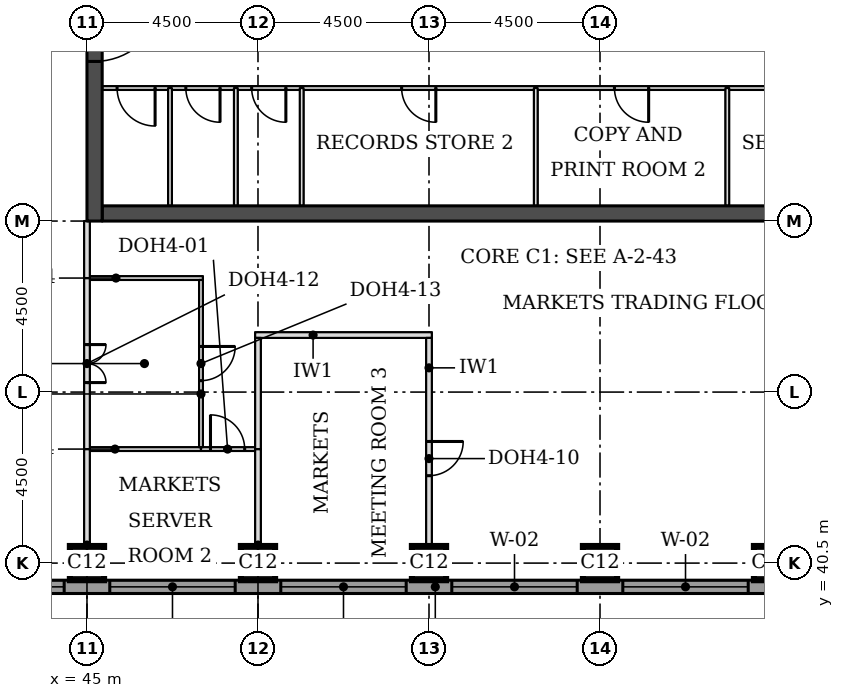
"""IFC4 building model, lengths in metres.
Left out: names, types, materials, properties, quantities, classifications, styles, units other than length and angle.
Written with IfcOpenShell. Run it as: python <this file> out.ifc"""

import sys

from ifc_helpers import new_model, si_unit, direction, frame, frame_2d, origin, origin_2d, place, context, subcontext, project, spatial, rectangle, extrude, element, fill, save


model = new_model("IFC4")
c1 = context("Model", 3, precision=1e-05, world=origin(), true_north=direction((0.0, 1.0)))
c2 = subcontext(c1, "Body", "Model", "MODEL_VIEW")
j1 = project(units=[si_unit("LENGTHUNIT", "METRE"), si_unit("PLANEANGLEUNIT", "RADIAN")], contexts=[c1])
p1 = place(None, origin())
s1 = spatial("IfcSite", under=j1, at=p1, CompositionType="ELEMENT")
p2 = place(p1, origin())
s2 = spatial("IfcBuilding", under=s1, at=p2, CompositionType="ELEMENT")
p3 = place(p2, frame((0.0, 0.0, 173.6)))
s3 = spatial("IfcBuildingStorey", under=s2, at=p3, CompositionType="ELEMENT", Elevation=173.6)
for number, where, z_axis, x_axis in (
    (1, (45.0, 40.5, 0.0), (0.0, 0.0, 1.0), (1.0, 0.0, 0.0)),
    (2, (49.5, 40.5, 0.0), (0.0, 0.0, 1.0), (1.0, 0.0, 0.0)),
    (3, (54.0, 40.5, 0.0), (0.0, 0.0, 1.0), (1.0, 0.0, 0.0)),
    (4, (58.5, 40.5, 0.0), (0.0, 0.0, 1.0), (1.0, 0.0, 0.0)),
    (5, (63.0, 40.5, 0.0), (0.0, 0.0, 1.0), (1.0, 0.0, 0.0)),
):
    element("IfcColumn", number, at=place(p3, frame(where, z_axis=z_axis, x_axis=x_axis)), inside=s3, PredefinedType="COLUMN", context=c2, shape_type="SweptSolid", body=[
        extrude(rectangle(XDim=0.9, YDim=0.9, at=origin_2d()), origin(), (0.0, 0.0, 1.0), 3.7),
    ])
p4 = place(p3, frame((45.4, 49.7, 0.0), z_axis=(0.0, 0.0, 1.0), x_axis=(1.0, 0.0, 0.0)))
e6 = element("IfcWall", 6, at=p4, inside=s3, PredefinedType="SHEAR", context=c2, shape_type="SweptSolid", body=[
    extrude(rectangle(XDim=21.7, YDim=0.4, at=frame_2d((10.85, 0.0))), origin(), (0.0, 0.0, 1.0), 3.7),
])
p5 = place(p3, frame((45.2, 49.5, 0.0), z_axis=(0.0, 0.0, 1.0), x_axis=(0.0, 1.0, 0.0)))
e7 = element("IfcWall", 7, at=p5, inside=s3, PredefinedType="SHEAR", context=c2, shape_type="SweptSolid", body=[
    extrude(rectangle(XDim=22.5, YDim=0.4, at=frame_2d((11.25, 0.0))), origin(), (0.0, 0.0, 1.0), 3.7),
])
p6 = place(p5, frame((4.2, 0.0, 0.0)))
e8 = element("IfcOpeningElement", 8, at=p6, cuts=e7, PredefinedType="OPENING", context=c2, shape_type="SweptSolid", body=[
    extrude(rectangle(XDim=1.8, YDim=2.1, at=frame_2d((0.9, 1.05))), frame((0.0, 0.21, 0.0), z_axis=(0.0, -1.0, 0.0), x_axis=(1.0, 0.0, 0.0)), (0.0, 0.0, 1.0), 0.42),
])
p7 = place(p5, frame((6.9, 0.0, 0.0)))
e9 = element("IfcOpeningElement", 9, at=p7, cuts=e7, PredefinedType="OPENING", context=c2, shape_type="SweptSolid", body=[
    extrude(rectangle(XDim=1.1, YDim=2.1, at=frame_2d((0.55, 1.05))), frame((0.0, 0.21, 0.0), z_axis=(0.0, -1.0, 0.0), x_axis=(1.0, 0.0, 0.0)), (0.0, 0.0, 1.0), 0.42),
])
p8 = place(p5, frame((13.6, 0.0, 0.0)))
e10 = element("IfcOpeningElement", 10, at=p8, cuts=e7, PredefinedType="OPENING", context=c2, shape_type="SweptSolid", body=[
    extrude(rectangle(XDim=1.1, YDim=2.1, at=frame_2d((0.55, 1.05))), frame((0.0, 0.21, 0.0), z_axis=(0.0, -1.0, 0.0), x_axis=(1.0, 0.0, 0.0)), (0.0, 0.0, 1.0), 0.42),
])
p9 = place(p5, frame((16.5, 0.0, 0.0)))
e11 = element("IfcOpeningElement", 11, at=p9, cuts=e7, PredefinedType="OPENING", context=c2, shape_type="SweptSolid", body=[
    extrude(rectangle(XDim=1.8, YDim=2.1, at=frame_2d((0.9, 1.05))), frame((0.0, 0.21, 0.0), z_axis=(0.0, -1.0, 0.0), x_axis=(1.0, 0.0, 0.0)), (0.0, 0.0, 1.0), 0.42),
])
p10 = place(p3, frame((36.0, 39.875, 0.0), z_axis=(0.0, 0.0, 1.0), x_axis=(1.0, 0.0, 0.0)))
e12 = element("IfcWall", 12, at=p10, inside=s3, PredefinedType="STANDARD", context=c2, shape_type="SweptSolid", body=[
    extrude(rectangle(XDim=36.331, YDim=0.35, at=frame_2d((18.166, 0.0))), origin(), (0.0, 0.0, 1.0), 3.525),
])
p11 = place(p10, frame((5.1, 0.0, 0.9)))
e13 = element("IfcOpeningElement", 13, at=p11, cuts=e12, PredefinedType="OPENING", context=c2, shape_type="SweptSolid", body=[
    extrude(rectangle(XDim=3.3, YDim=1.9, at=frame_2d((1.65, 0.95))), frame((0.0, 0.185, 0.0), z_axis=(0.0, -1.0, 0.0), x_axis=(1.0, 0.0, 0.0)), (0.0, 0.0, 1.0), 0.37),
])
p12 = place(p10, frame((9.6, 0.0, 0.9)))
e14 = element("IfcOpeningElement", 14, at=p12, cuts=e12, PredefinedType="OPENING", context=c2, shape_type="SweptSolid", body=[
    extrude(rectangle(XDim=3.3, YDim=1.9, at=frame_2d((1.65, 0.95))), frame((0.0, 0.185, 0.0), z_axis=(0.0, -1.0, 0.0), x_axis=(1.0, 0.0, 0.0)), (0.0, 0.0, 1.0), 0.37),
])
p13 = place(p10, frame((14.1, 0.0, 0.9)))
e15 = element("IfcOpeningElement", 15, at=p13, cuts=e12, PredefinedType="OPENING", context=c2, shape_type="SweptSolid", body=[
    extrude(rectangle(XDim=3.3, YDim=1.9, at=frame_2d((1.65, 0.95))), frame((0.0, 0.185, 0.0), z_axis=(0.0, -1.0, 0.0), x_axis=(1.0, 0.0, 0.0)), (0.0, 0.0, 1.0), 0.37),
])
p14 = place(p10, frame((18.6, 0.0, 0.9)))
e16 = element("IfcOpeningElement", 16, at=p14, cuts=e12, PredefinedType="OPENING", context=c2, shape_type="SweptSolid", body=[
    extrude(rectangle(XDim=3.3, YDim=1.9, at=frame_2d((1.65, 0.95))), frame((0.0, 0.185, 0.0), z_axis=(0.0, -1.0, 0.0), x_axis=(1.0, 0.0, 0.0)), (0.0, 0.0, 1.0), 0.37),
])
p15 = place(p10, frame((23.1, 0.0, 0.9)))
e17 = element("IfcOpeningElement", 17, at=p15, cuts=e12, PredefinedType="OPENING", context=c2, shape_type="SweptSolid", body=[
    extrude(rectangle(XDim=3.3, YDim=1.9, at=frame_2d((1.65, 0.95))), frame((0.0, 0.185, 0.0), z_axis=(0.0, -1.0, 0.0), x_axis=(1.0, 0.0, 0.0)), (0.0, 0.0, 1.0), 0.37),
])
p16 = place(p10, frame((27.6, 0.0, 0.9)))
e18 = element("IfcOpeningElement", 18, at=p16, cuts=e12, PredefinedType="OPENING", context=c2, shape_type="SweptSolid", body=[
    extrude(rectangle(XDim=3.3, YDim=1.9, at=frame_2d((1.65, 0.95))), frame((0.0, 0.185, 0.0), z_axis=(0.0, -1.0, 0.0), x_axis=(1.0, 0.0, 0.0)), (0.0, 0.0, 1.0), 0.37),
])
p17 = place(p3, frame((45.075, 43.5, 0.0), z_axis=(0.0, 0.0, 1.0), x_axis=(1.0, 0.0, 0.0)))
e19 = element("IfcWall", 19, at=p17, inside=s3, PredefinedType="PARTITIONING", context=c2, shape_type="SweptSolid", body=[
    extrude(rectangle(XDim=2.925, YDim=0.1, at=frame_2d((1.462, 0.0))), origin(), (0.0, 0.0, 1.0), 3.55),
])
p18 = place(p3, frame((48.0, 43.5, 0.0), z_axis=(0.0, 0.0, 1.0), x_axis=(1.0, 0.0, 0.0)))
e20 = element("IfcWall", 20, at=p18, inside=s3, PredefinedType="PARTITIONING", context=c2, shape_type="SweptSolid", body=[
    extrude(rectangle(XDim=1.425, YDim=0.1, at=frame_2d((0.712, 0.0))), origin(), (0.0, 0.0, 1.0), 3.55),
])
p19 = place(p18, frame((0.25, 0.0, 0.0)))
e21 = element("IfcOpeningElement", 21, at=p19, cuts=e20, PredefinedType="OPENING", context=c2, shape_type="SweptSolid", body=[
    extrude(rectangle(XDim=0.9, YDim=2.1, at=frame_2d((0.45, 1.05))), frame((0.0, 0.06, 0.0), z_axis=(0.0, -1.0, 0.0), x_axis=(1.0, 0.0, 0.0)), (0.0, 0.0, 1.0), 0.12),
])
p20 = place(p3, frame((49.425, 46.5, 0.0), z_axis=(0.0, 0.0, 1.0), x_axis=(1.0, 0.0, 0.0)))
e22 = element("IfcWall", 22, at=p20, inside=s3, PredefinedType="PARTITIONING", context=c2, shape_type="SweptSolid", body=[
    extrude(rectangle(XDim=4.65, YDim=0.15, at=frame_2d((2.325, 0.0))), origin(), (0.0, 0.0, 1.0), 3.55),
])
p21 = place(p3, frame((45.075, 48.0, 0.0), z_axis=(0.0, 0.0, 1.0), x_axis=(1.0, 0.0, 0.0)))
e23 = element("IfcWall", 23, at=p21, inside=s3, PredefinedType="PARTITIONING", context=c2, shape_type="SweptSolid", body=[
    extrude(rectangle(XDim=2.975, YDim=0.1, at=frame_2d((1.488, 0.0))), origin(), (0.0, 0.0, 1.0), 3.55),
])
p22 = place(p3, frame((45.0, 40.05, 0.0), z_axis=(0.0, 0.0, 1.0), x_axis=(0.0, 1.0, 0.0)))
e24 = element("IfcWall", 24, at=p22, inside=s3, PredefinedType="PARTITIONING", context=c2, shape_type="SweptSolid", body=[
    extrude(rectangle(XDim=3.45, YDim=0.15, at=frame_2d((1.725, 0.0))), origin(), (0.0, 0.0, 1.0), 3.022),
])
p23 = place(p3, frame((49.5, 40.05, 0.0), z_axis=(0.0, 0.0, 1.0), x_axis=(0.0, 1.0, 0.0)))
e25 = element("IfcWall", 25, at=p23, inside=s3, PredefinedType="PARTITIONING", context=c2, shape_type="SweptSolid", body=[
    extrude(rectangle(XDim=3.45, YDim=0.15, at=frame_2d((1.725, 0.0))), origin(), (0.0, 0.0, 1.0), 3.55),
])
p24 = place(p3, frame((54.0, 40.05, 0.0), z_axis=(0.0, 0.0, 1.0), x_axis=(0.0, 1.0, 0.0)))
e26 = element("IfcWall", 26, at=p24, inside=s3, PredefinedType="PARTITIONING", context=c2, shape_type="SweptSolid", body=[
    extrude(rectangle(XDim=6.375, YDim=0.15, at=frame_2d((3.188, 0.0))), origin(), (0.0, 0.0, 1.0), 3.55),
])
p25 = place(p24, frame((2.75, 0.0, 0.0)))
e27 = element("IfcOpeningElement", 27, at=p25, cuts=e26, PredefinedType="OPENING", context=c2, shape_type="SweptSolid", body=[
    extrude(rectangle(XDim=0.9, YDim=2.1, at=frame_2d((0.45, 1.05))), frame((0.0, 0.085, 0.0), z_axis=(0.0, -1.0, 0.0), x_axis=(1.0, 0.0, 0.0)), (0.0, 0.0, 1.0), 0.17),
])
p26 = place(p3, frame((45.0, 43.5, 0.0), z_axis=(0.0, 0.0, 1.0), x_axis=(0.0, 1.0, 0.0)))
e28 = element("IfcWall", 28, at=p26, inside=s3, PredefinedType="PARTITIONING", context=c2, shape_type="SweptSolid", body=[
    extrude(rectangle(XDim=4.5, YDim=0.15, at=frame_2d((2.25, 0.0))), origin(), (0.0, 0.0, 1.0), 3.022),
])
p27 = place(p26, frame((1.75, 0.0, 0.0)))
e29 = element("IfcOpeningElement", 29, at=p27, cuts=e28, PredefinedType="OPENING", context=c2, shape_type="SweptSolid", body=[
    extrude(rectangle(XDim=1.0, YDim=2.1, at=frame_2d((0.5, 1.05))), frame((0.0, 0.085, 0.0), z_axis=(0.0, -1.0, 0.0), x_axis=(1.0, 0.0, 0.0)), (0.0, 0.0, 1.0), 0.17),
])
p28 = place(p3, frame((49.5, 43.5, 0.0), z_axis=(0.0, 0.0, 1.0), x_axis=(0.0, 1.0, 0.0)))
e30 = element("IfcWall", 30, at=p28, inside=s3, PredefinedType="PARTITIONING", context=c2, shape_type="SweptSolid", body=[
    extrude(rectangle(XDim=2.925, YDim=0.15, at=frame_2d((1.462, 0.0))), origin(), (0.0, 0.0, 1.0), 3.55),
])
p29 = place(p3, frame((48.0, 43.55, 0.0), z_axis=(0.0, 0.0, 1.0), x_axis=(0.0, 1.0, 0.0)))
e31 = element("IfcWall", 31, at=p29, inside=s3, PredefinedType="PARTITIONING", context=c2, shape_type="SweptSolid", body=[
    extrude(rectangle(XDim=4.4, YDim=0.1, at=frame_2d((2.2, 0.0))), origin(), (0.0, 0.0, 1.0), 3.55),
])
p30 = place(p29, frame((1.75, 0.0, 0.0)))
e32 = element("IfcOpeningElement", 32, at=p30, cuts=e31, PredefinedType="OPENING", context=c2, shape_type="SweptSolid", body=[
    extrude(rectangle(XDim=0.9, YDim=2.1, at=frame_2d((0.45, 1.05))), frame((0.0, 0.06, 0.0), z_axis=(0.0, -1.0, 0.0), x_axis=(1.0, 0.0, 0.0)), (0.0, 0.0, 1.0), 0.12),
])
p31 = place(p3, frame((45.0, 48.0, 0.0), z_axis=(0.0, 0.0, 1.0), x_axis=(0.0, 1.0, 0.0)))
e33 = element("IfcWall", 33, at=p31, inside=s3, PredefinedType="PARTITIONING", context=c2, shape_type="SweptSolid", body=[
    extrude(rectangle(XDim=1.5, YDim=0.15, at=frame_2d((0.75, 0.0))), origin(), (0.0, 0.0, 1.0), 3.022),
])
p32 = place(p3, frame((45.4, 53.0, 0.0), z_axis=(0.0, 0.0, 1.0), x_axis=(1.0, 0.0, 0.0)))
e34 = element("IfcWall", 34, at=p32, inside=s3, PredefinedType="PARTITIONING", context=c2, shape_type="SweptSolid", body=[
    extrude(rectangle(XDim=21.7, YDim=0.1, at=frame_2d((10.85, 0.0))), origin(), (0.0, 0.0, 1.0), 3.55),
])
p33 = place(p32, frame((18.625, 0.0, 0.0)))
e35 = element("IfcOpeningElement", 35, at=p33, cuts=e34, PredefinedType="OPENING", context=c2, shape_type="SweptSolid", body=[
    extrude(rectangle(XDim=0.9, YDim=2.1, at=frame_2d((0.45, 1.05))), frame((0.0, 0.06, 0.0), z_axis=(0.0, -1.0, 0.0), x_axis=(1.0, 0.0, 0.0)), (0.0, 0.0, 1.0), 0.12),
])
p34 = place(p32, frame((0.393, 0.0, 0.0)))
e36 = element("IfcOpeningElement", 36, at=p34, cuts=e34, PredefinedType="OPENING", context=c2, shape_type="SweptSolid", body=[
    extrude(rectangle(XDim=1.0, YDim=2.1, at=frame_2d((0.5, 1.05))), frame((0.0, 0.06, 0.0), z_axis=(0.0, -1.0, 0.0), x_axis=(1.0, 0.0, 0.0)), (0.0, 0.0, 1.0), 0.12),
])
p35 = place(p32, frame((2.201, 0.0, 0.0)))
e37 = element("IfcOpeningElement", 37, at=p35, cuts=e34, PredefinedType="OPENING", context=c2, shape_type="SweptSolid", body=[
    extrude(rectangle(XDim=0.9, YDim=2.1, at=frame_2d((0.45, 1.05))), frame((0.0, 0.06, 0.0), z_axis=(0.0, -1.0, 0.0), x_axis=(1.0, 0.0, 0.0)), (0.0, 0.0, 1.0), 0.12),
])
p36 = place(p32, frame((3.934, 0.0, 0.0)))
e38 = element("IfcOpeningElement", 38, at=p36, cuts=e34, PredefinedType="OPENING", context=c2, shape_type="SweptSolid", body=[
    extrude(rectangle(XDim=0.9, YDim=2.1, at=frame_2d((0.45, 1.05))), frame((0.0, 0.06, 0.0), z_axis=(0.0, -1.0, 0.0), x_axis=(1.0, 0.0, 0.0)), (0.0, 0.0, 1.0), 0.12),
])
p37 = place(p32, frame((7.88, 0.0, 0.0)))
e39 = element("IfcOpeningElement", 39, at=p37, cuts=e34, PredefinedType="OPENING", context=c2, shape_type="SweptSolid", body=[
    extrude(rectangle(XDim=0.9, YDim=2.1, at=frame_2d((0.45, 1.05))), frame((0.0, 0.06, 0.0), z_axis=(0.0, -1.0, 0.0), x_axis=(1.0, 0.0, 0.0)), (0.0, 0.0, 1.0), 0.12),
])
p38 = place(p32, frame((13.48, 0.0, 0.0)))
e40 = element("IfcOpeningElement", 40, at=p38, cuts=e34, PredefinedType="OPENING", context=c2, shape_type="SweptSolid", body=[
    extrude(rectangle(XDim=0.9, YDim=2.1, at=frame_2d((0.45, 1.05))), frame((0.0, 0.06, 0.0), z_axis=(0.0, -1.0, 0.0), x_axis=(1.0, 0.0, 0.0)), (0.0, 0.0, 1.0), 0.12),
])
for number, where, z_axis, x_axis in (
    (41, (47.185, 49.9, 0.0), (0.0, 0.0, 1.0), (0.0, 1.0, 0.0)),
    (42, (48.917, 49.9, 0.0), (0.0, 0.0, 1.0), (0.0, 1.0, 0.0)),
    (43, (50.65, 49.9, 0.0), (0.0, 0.0, 1.0), (0.0, 1.0, 0.0)),
    (44, (56.81, 49.9, 0.0), (0.0, 0.0, 1.0), (0.0, 1.0, 0.0)),
    (45, (61.85, 49.9, 0.0), (0.0, 0.0, 1.0), (0.0, 1.0, 0.0)),
):
    element("IfcWall", number, at=place(p3, frame(where, z_axis=z_axis, x_axis=x_axis)), inside=s3, PredefinedType="PARTITIONING", context=c2, shape_type="SweptSolid", body=[
        extrude(rectangle(XDim=3.1, YDim=0.1, at=frame_2d((1.55, 0.0))), origin(), (0.0, 0.0, 1.0), 3.55),
    ])
p39 = place(p11, origin())
e46 = element("IfcWindow", 46, at=p39, inside=s3, PartitioningType="SINGLE_PANEL", PredefinedType="WINDOW", context=c2, shape_type="SweptSolid", body=[
    extrude(rectangle(XDim=3.3, YDim=1.9, at=frame_2d((1.65, 0.95))), frame((0.0, 0.085, 0.0), z_axis=(0.0, -1.0, 0.0), x_axis=(1.0, 0.0, 0.0)), (0.0, 0.0, 1.0), 0.06),
])
fill(e13, e46)
p40 = place(p12, origin())
e47 = element("IfcWindow", 47, at=p40, inside=s3, PartitioningType="SINGLE_PANEL", PredefinedType="WINDOW", context=c2, shape_type="SweptSolid", body=[
    extrude(rectangle(XDim=3.3, YDim=1.9, at=frame_2d((1.65, 0.95))), frame((0.0, 0.085, 0.0), z_axis=(0.0, -1.0, 0.0), x_axis=(1.0, 0.0, 0.0)), (0.0, 0.0, 1.0), 0.06),
])
fill(e14, e47)
p41 = place(p13, origin())
e48 = element("IfcWindow", 48, at=p41, inside=s3, PartitioningType="SINGLE_PANEL", PredefinedType="WINDOW", context=c2, shape_type="SweptSolid", body=[
    extrude(rectangle(XDim=3.3, YDim=1.9, at=frame_2d((1.65, 0.95))), frame((0.0, 0.085, 0.0), z_axis=(0.0, -1.0, 0.0), x_axis=(1.0, 0.0, 0.0)), (0.0, 0.0, 1.0), 0.06),
])
fill(e15, e48)
p42 = place(p14, origin())
e49 = element("IfcWindow", 49, at=p42, inside=s3, PartitioningType="SINGLE_PANEL", PredefinedType="WINDOW", context=c2, shape_type="SweptSolid", body=[
    extrude(rectangle(XDim=3.3, YDim=1.9, at=frame_2d((1.65, 0.95))), frame((0.0, 0.085, 0.0), z_axis=(0.0, -1.0, 0.0), x_axis=(1.0, 0.0, 0.0)), (0.0, 0.0, 1.0), 0.06),
])
fill(e16, e49)
p43 = place(p15, origin())
e50 = element("IfcWindow", 50, at=p43, inside=s3, PartitioningType="SINGLE_PANEL", PredefinedType="WINDOW", context=c2, shape_type="SweptSolid", body=[
    extrude(rectangle(XDim=3.3, YDim=1.9, at=frame_2d((1.65, 0.95))), frame((0.0, 0.085, 0.0), z_axis=(0.0, -1.0, 0.0), x_axis=(1.0, 0.0, 0.0)), (0.0, 0.0, 1.0), 0.06),
])
fill(e17, e50)
p44 = place(p27, frame((1.0, 0.0, 0.0), z_axis=(0.0, 0.0, 1.0), x_axis=(-1.0, 0.0, 0.0)))
e51 = element("IfcDoor", 51, at=p44, inside=s3, OperationType="DOUBLE_DOOR_SINGLE_SWING", PredefinedType="DOOR", context=c2, shape_type="SweptSolid", body=[
    extrude(rectangle(XDim=1.0, YDim=2.1, at=frame_2d((0.5, 1.05))), frame((0.0, 0.025, 0.0), z_axis=(0.0, -1.0, 0.0), x_axis=(1.0, 0.0, 0.0)), (0.0, 0.0, 1.0), 0.05),
])
fill(e29, e51)
p45 = place(p30, frame((0.9, 0.0, 0.0), z_axis=(0.0, 0.0, 1.0), x_axis=(-1.0, 0.0, 0.0)))
e52 = element("IfcDoor", 52, at=p45, inside=s3, OperationType="SINGLE_SWING_LEFT", PredefinedType="DOOR", context=c2, shape_type="SweptSolid", body=[
    extrude(rectangle(XDim=0.9, YDim=2.1, at=frame_2d((0.45, 1.05))), frame((0.0, 0.025, 0.0), z_axis=(0.0, -1.0, 0.0), x_axis=(1.0, 0.0, 0.0)), (0.0, 0.0, 1.0), 0.05),
])
fill(e32, e52)
p46 = place(p25, frame((0.9, 0.0, 0.0), z_axis=(0.0, 0.0, 1.0), x_axis=(-1.0, 0.0, 0.0)))
e53 = element("IfcDoor", 53, at=p46, inside=s3, OperationType="SINGLE_SWING_LEFT", PredefinedType="DOOR", context=c2, shape_type="SweptSolid", body=[
    extrude(rectangle(XDim=0.9, YDim=2.1, at=frame_2d((0.45, 1.05))), frame((0.0, 0.025, 0.0), z_axis=(0.0, -1.0, 0.0), x_axis=(1.0, 0.0, 0.0)), (0.0, 0.0, 1.0), 0.05),
])
fill(e27, e53)
p47 = place(p19, origin())
e54 = element("IfcDoor", 54, at=p47, inside=s3, OperationType="SINGLE_SWING_LEFT", PredefinedType="DOOR", context=c2, shape_type="SweptSolid", body=[
    extrude(rectangle(XDim=0.9, YDim=2.1, at=frame_2d((0.45, 1.05))), frame((0.0, 0.025, 0.0), z_axis=(0.0, -1.0, 0.0), x_axis=(1.0, 0.0, 0.0)), (0.0, 0.0, 1.0), 0.05),
])
fill(e21, e54)
p48 = place(p6, frame((1.8, 0.0, 0.0), z_axis=(0.0, 0.0, 1.0), x_axis=(-1.0, 0.0, 0.0)))
e55 = element("IfcDoor", 55, at=p48, inside=s3, OperationType="SINGLE_SWING_LEFT", PredefinedType="DOOR", context=c2, shape_type="SweptSolid", body=[
    extrude(rectangle(XDim=1.8, YDim=2.1, at=frame_2d((0.9, 1.05))), frame((0.0, 0.025, 0.0), z_axis=(0.0, -1.0, 0.0), x_axis=(1.0, 0.0, 0.0)), (0.0, 0.0, 1.0), 0.05),
])
fill(e8, e55)
p49 = place(p34, frame((1.0, 0.0, 0.0), z_axis=(0.0, 0.0, 1.0), x_axis=(-1.0, 0.0, 0.0)))
e56 = element("IfcDoor", 56, at=p49, inside=s3, OperationType="SINGLE_SWING_LEFT", PredefinedType="DOOR", context=c2, shape_type="SweptSolid", body=[
    extrude(rectangle(XDim=1.0, YDim=2.1, at=frame_2d((0.5, 1.05))), frame((0.0, 0.025, 0.0), z_axis=(0.0, -1.0, 0.0), x_axis=(1.0, 0.0, 0.0)), (0.0, 0.0, 1.0), 0.05),
])
fill(e36, e56)
p50 = place(p35, frame((0.9, 0.0, 0.0), z_axis=(0.0, 0.0, 1.0), x_axis=(-1.0, 0.0, 0.0)))
e57 = element("IfcDoor", 57, at=p50, inside=s3, OperationType="SINGLE_SWING_LEFT", PredefinedType="DOOR", context=c2, shape_type="SweptSolid", body=[
    extrude(rectangle(XDim=0.9, YDim=2.1, at=frame_2d((0.45, 1.05))), frame((0.0, 0.025, 0.0), z_axis=(0.0, -1.0, 0.0), x_axis=(1.0, 0.0, 0.0)), (0.0, 0.0, 1.0), 0.05),
])
fill(e37, e57)
p51 = place(p36, frame((0.9, 0.0, 0.0), z_axis=(0.0, 0.0, 1.0), x_axis=(-1.0, 0.0, 0.0)))
e58 = element("IfcDoor", 58, at=p51, inside=s3, OperationType="SINGLE_SWING_LEFT", PredefinedType="DOOR", context=c2, shape_type="SweptSolid", body=[
    extrude(rectangle(XDim=0.9, YDim=2.1, at=frame_2d((0.45, 1.05))), frame((0.0, 0.025, 0.0), z_axis=(0.0, -1.0, 0.0), x_axis=(1.0, 0.0, 0.0)), (0.0, 0.0, 1.0), 0.05),
])
fill(e38, e58)
p52 = place(p37, frame((0.9, 0.0, 0.0), z_axis=(0.0, 0.0, 1.0), x_axis=(-1.0, 0.0, 0.0)))
e59 = element("IfcDoor", 59, at=p52, inside=s3, OperationType="SINGLE_SWING_LEFT", PredefinedType="DOOR", context=c2, shape_type="SweptSolid", body=[
    extrude(rectangle(XDim=0.9, YDim=2.1, at=frame_2d((0.45, 1.05))), frame((0.0, 0.025, 0.0), z_axis=(0.0, -1.0, 0.0), x_axis=(1.0, 0.0, 0.0)), (0.0, 0.0, 1.0), 0.05),
])
fill(e39, e59)
p53 = place(p38, frame((0.9, 0.0, 0.0), z_axis=(0.0, 0.0, 1.0), x_axis=(-1.0, 0.0, 0.0)))
e60 = element("IfcDoor", 60, at=p53, inside=s3, OperationType="SINGLE_SWING_LEFT", PredefinedType="DOOR", context=c2, shape_type="SweptSolid", body=[
    extrude(rectangle(XDim=0.9, YDim=2.1, at=frame_2d((0.45, 1.05))), frame((0.0, 0.025, 0.0), z_axis=(0.0, -1.0, 0.0), x_axis=(1.0, 0.0, 0.0)), (0.0, 0.0, 1.0), 0.05),
])
fill(e40, e60)
save(model, sys.argv[1])
